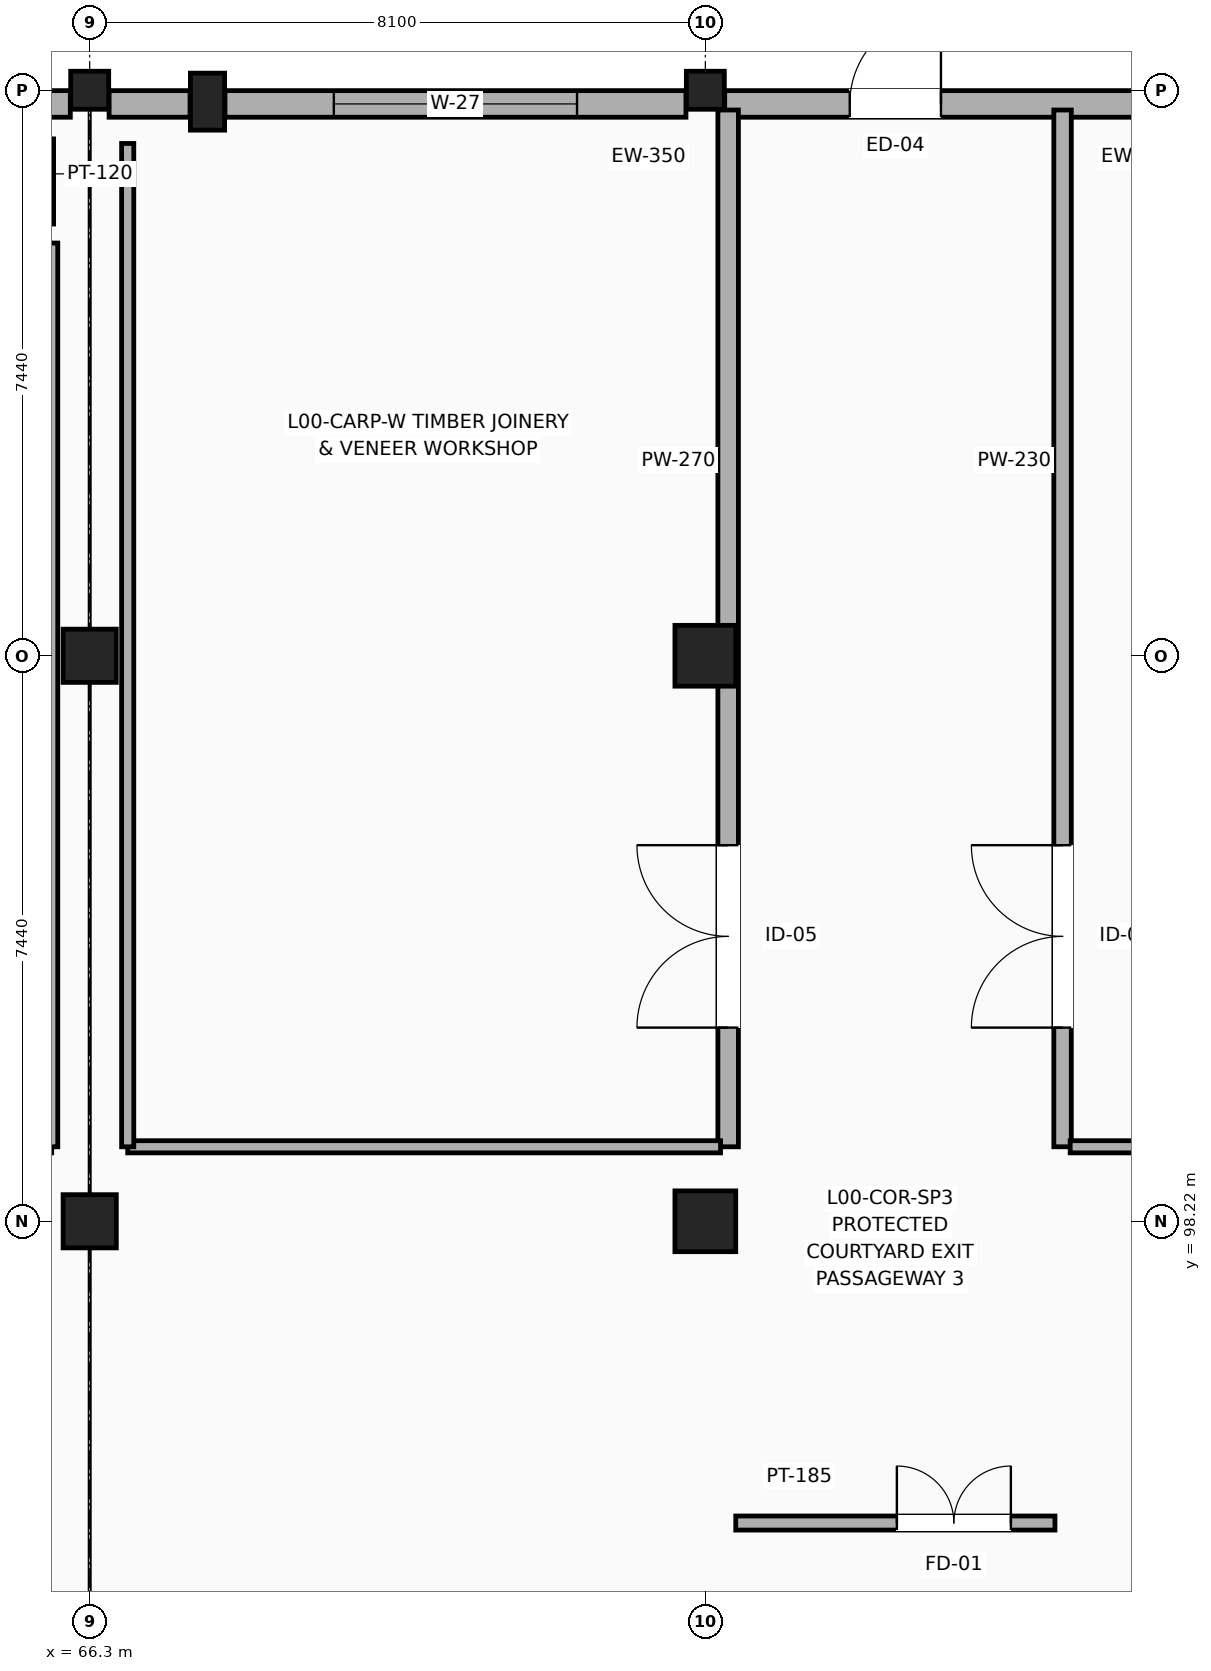
"""IFC4 building model, lengths in metres.
Left out: names, types, materials, properties, quantities, classifications, styles, units other than length and angle.
Written with IfcOpenShell. Run it as: python <this file> out.ifc"""

import sys

from ifc_helpers import new_model, si_unit, direction, frame, frame_2d, origin, origin_2d, place, context, subcontext, project, spatial, rectangle, extrude, element, fill, save


model = new_model("IFC4")
c1 = context("Model", 3, precision=1e-05, world=origin(), true_north=direction((0.0, 1.0)))
c2 = subcontext(c1, "Body", "Model", "MODEL_VIEW")
j1 = project(units=[si_unit("LENGTHUNIT", "METRE"), si_unit("PLANEANGLEUNIT", "RADIAN")], contexts=[c1])
p1 = place(None, origin())
s1 = spatial("IfcSite", under=j1, at=p1, CompositionType="ELEMENT")
p2 = place(p1, origin())
s2 = spatial("IfcBuilding", under=s1, at=p2, CompositionType="ELEMENT")
p3 = place(p2, origin())
s3 = spatial("IfcBuildingStorey", under=s2, at=p3, CompositionType="ELEMENT", Elevation=0.0)
p4 = place(p3, frame((67.85, 112.95, 0.0), z_axis=(0.0, 0.0, 1.0), x_axis=(1.0, 0.0, 0.0)))
e1 = element("IfcColumn", 1, at=p4, inside=s3, PredefinedType="PILASTER", context=c2, shape_type="SweptSolid", body=[
    extrude(rectangle(XDim=0.45, YDim=0.75, at=origin_2d()), origin(), (0.0, 0.0, 1.0), 5.4),
])
for number, where, z_axis, x_axis in (
    (2, (66.3, 98.22, 0.0), (0.0, 0.0, 1.0), (1.0, 0.0, 0.0)),
    (3, (66.3, 105.66, 0.0), (0.0, 0.0, 1.0), (1.0, 0.0, 0.0)),
):
    element("IfcColumn", number, at=place(p3, frame(where, z_axis=z_axis, x_axis=x_axis)), inside=s3, PredefinedType="COLUMN", context=c2, shape_type="SweptSolid", body=[
        extrude(rectangle(XDim=0.7, YDim=0.7, at=origin_2d()), origin(), (0.0, 0.0, 1.0), 5.4),
    ])
p5 = place(p3, frame((66.3, 113.1, 0.0), z_axis=(0.0, 0.0, 1.0), x_axis=(1.0, 0.0, 0.0)))
e4 = element("IfcColumn", 4, at=p5, inside=s3, PredefinedType="COLUMN", context=c2, shape_type="SweptSolid", body=[
    extrude(rectangle(XDim=0.5, YDim=0.5, at=origin_2d()), origin(), (0.0, 0.0, 1.0), 5.4),
])
for number, where, z_axis, x_axis in (
    (5, (74.4, 98.22, 0.0), (0.0, 0.0, 1.0), (1.0, 0.0, 0.0)),
    (6, (74.4, 105.66, 0.0), (0.0, 0.0, 1.0), (1.0, 0.0, 0.0)),
):
    element("IfcColumn", number, at=place(p3, frame(where, z_axis=z_axis, x_axis=x_axis)), inside=s3, PredefinedType="COLUMN", context=c2, shape_type="SweptSolid", body=[
        extrude(rectangle(XDim=0.8, YDim=0.8, at=origin_2d()), origin(), (0.0, 0.0, 1.0), 5.4),
    ])
p6 = place(p3, frame((74.4, 113.1, 0.0), z_axis=(0.0, 0.0, 1.0), x_axis=(1.0, 0.0, 0.0)))
e7 = element("IfcColumn", 7, at=p6, inside=s3, PredefinedType="COLUMN", context=c2, shape_type="SweptSolid", body=[
    extrude(rectangle(XDim=0.5, YDim=0.5, at=origin_2d()), origin(), (0.0, 0.0, 1.0), 5.4),
])
p7 = place(p3, frame((58.455, 112.92, 0.0), z_axis=(0.0, 0.0, 1.0), x_axis=(1.0, 0.0, 0.0)))
e8 = element("IfcWall", 8, at=p7, inside=s3, PredefinedType="SOLIDWALL", context=c2, shape_type="SweptSolid", body=[
    extrude(rectangle(XDim=7.59, YDim=0.35, at=frame_2d((3.795, 0.0))), origin(), (0.0, 0.0, 1.0), 4.037),
])
p8 = place(p7, frame((2.72, 0.0, 0.9)))
e9 = element("IfcOpeningElement", 9, at=p8, cuts=e8, PredefinedType="OPENING", context=c2, shape_type="SweptSolid", body=[
    extrude(rectangle(XDim=2.15, YDim=2.25, at=frame_2d((1.075, 1.125))), frame((0.0, 0.185, 0.0), z_axis=(0.0, -1.0, 0.0), x_axis=(1.0, 0.0, 0.0)), (0.0, 0.0, 1.0), 0.37),
])
p9 = place(p3, frame((68.08, 112.92, 0.0), z_axis=(0.0, 0.0, 1.0), x_axis=(1.0, 0.0, 0.0)))
e10 = element("IfcWall", 10, at=p9, inside=s3, PredefinedType="SOLIDWALL", context=c2, shape_type="SweptSolid", body=[
    extrude(rectangle(XDim=6.065, YDim=0.35, at=frame_2d((3.032, 0.0))), origin(), (0.0, 0.0, 1.0), 4.137),
])
p10 = place(p9, frame((1.432, 0.0, 0.9)))
e11 = element("IfcOpeningElement", 11, at=p10, cuts=e10, PredefinedType="OPENING", context=c2, shape_type="SweptSolid", body=[
    extrude(rectangle(XDim=3.2, YDim=2.1, at=frame_2d((1.6, 1.05))), frame((0.0, 0.185, 0.0), z_axis=(0.0, -1.0, 0.0), x_axis=(1.0, 0.0, 0.0)), (0.0, 0.0, 1.0), 0.37),
])
p11 = place(p3, frame((66.555, 112.92, 0.0), z_axis=(0.0, 0.0, 1.0), x_axis=(1.0, 0.0, 0.0)))
e12 = element("IfcWall", 12, at=p11, inside=s3, PredefinedType="SOLIDWALL", context=c2, shape_type="SweptSolid", body=[
    extrude(rectangle(XDim=1.065, YDim=0.35, at=frame_2d((0.533, 0.0))), origin(), (0.0, 0.0, 1.0), 4.137),
])
p12 = place(p3, frame((74.655, 112.92, 0.0), z_axis=(0.0, 0.0, 1.0), x_axis=(1.0, 0.0, 0.0)))
e13 = element("IfcWall", 13, at=p12, inside=s3, PredefinedType="SOLIDWALL", context=c2, shape_type="SweptSolid", body=[
    extrude(rectangle(XDim=7.59, YDim=0.35, at=frame_2d((3.795, 0.0))), origin(), (0.0, 0.0, 1.0), 4.037),
])
p13 = place(p12, frame((1.645, 0.0, 0.0)))
e14 = element("IfcOpeningElement", 14, at=p13, cuts=e13, PredefinedType="OPENING", context=c2, shape_type="SweptSolid", body=[
    extrude(rectangle(XDim=1.2, YDim=2.2, at=frame_2d((0.6, 1.1))), frame((0.0, 0.185, 0.0), z_axis=(0.0, -1.0, 0.0), x_axis=(1.0, 0.0, 0.0)), (0.0, 0.0, 1.0), 0.37),
])
p14 = place(p3, frame((65.765, 111.34, 0.0), z_axis=(0.0, 0.0, 1.0), x_axis=(0.0, 1.0, 0.0)))
e15 = element("IfcWall", 15, at=p14, inside=s3, PredefinedType="PARTITIONING", context=c2, shape_type="SweptSolid", body=[
    extrude(rectangle(XDim=1.12, YDim=0.12, at=frame_2d((0.56, 0.0))), origin(), (0.0, 0.0, 1.0), 5.085),
])
p15 = place(p3, frame((74.8, 94.25, 0.0), z_axis=(0.0, 0.0, 1.0), x_axis=(1.0, 0.0, 0.0)))
e16 = element("IfcWall", 16, at=p15, inside=s3, PredefinedType="PARTITIONING", context=c2, shape_type="SweptSolid", body=[
    extrude(rectangle(XDim=4.2, YDim=0.185, at=frame_2d((2.1, 0.0))), origin(), (0.0, 0.0, 1.0), 4.817),
])
p16 = place(p15, frame((2.12, 0.0, 0.0)))
e17 = element("IfcOpeningElement", 17, at=p16, cuts=e16, PredefinedType="OPENING", context=c2, shape_type="SweptSolid", body=[
    extrude(rectangle(XDim=1.5, YDim=2.2, at=frame_2d((0.75, 1.1))), frame((0.0, 0.103, 0.0), z_axis=(0.0, -1.0, 0.0), x_axis=(1.0, 0.0, 0.0)), (0.0, 0.0, 1.0), 0.205),
])
p17 = place(p3, frame((74.7, 99.2, 0.0), z_axis=(0.0, 0.0, 1.0), x_axis=(0.0, 1.0, 0.0)))
e18 = element("IfcWall", 18, at=p17, inside=s3, PredefinedType="SOLIDWALL", context=c2, shape_type="SweptSolid", body=[
    extrude(rectangle(XDim=13.64, YDim=0.27, at=frame_2d((6.82, 0.0))), origin(), (0.0, 0.0, 1.0), 4.137),
])
p18 = place(p17, frame((1.568, 0.0, 0.0)))
e19 = element("IfcOpeningElement", 19, at=p18, cuts=e18, PredefinedType="OPENING", context=c2, shape_type="SweptSolid", body=[
    extrude(rectangle(XDim=2.4, YDim=2.8, at=frame_2d((1.2, 1.4))), frame((0.0, 0.145, 0.0), z_axis=(0.0, -1.0, 0.0), x_axis=(1.0, 0.0, 0.0)), (0.0, 0.0, 1.0), 0.29),
])
p19 = place(p3, frame((79.1, 99.2, 0.0), z_axis=(0.0, 0.0, 1.0), x_axis=(0.0, 1.0, 0.0)))
e20 = element("IfcWall", 20, at=p19, inside=s3, PredefinedType="SOLIDWALL", context=c2, shape_type="SweptSolid", body=[
    extrude(rectangle(XDim=13.64, YDim=0.23, at=frame_2d((6.82, 0.0))), origin(), (0.0, 0.0, 1.0), 4.137),
])
p20 = place(p19, frame((1.568, 0.0, 0.0)))
e21 = element("IfcOpeningElement", 21, at=p20, cuts=e20, PredefinedType="OPENING", context=c2, shape_type="SweptSolid", body=[
    extrude(rectangle(XDim=2.4, YDim=2.8, at=frame_2d((1.2, 1.4))), frame((0.0, 0.125, 0.0), z_axis=(0.0, -1.0, 0.0), x_axis=(1.0, 0.0, 0.0)), (0.0, 0.0, 1.0), 0.25),
])
p21 = place(p3, frame((65.8, 99.2, 0.0), z_axis=(0.0, 0.0, 1.0), x_axis=(0.0, 1.0, 0.0)))
e22 = element("IfcWall", 22, at=p21, inside=s3, PredefinedType="PARTITIONING", context=c2, shape_type="SweptSolid", body=[
    extrude(rectangle(XDim=11.89, YDim=0.16, at=frame_2d((5.945, 0.0))), origin(), (0.0, 0.0, 1.0), 4.137),
])
p22 = place(p3, frame((66.8, 99.2, 0.0), z_axis=(0.0, 0.0, 1.0), x_axis=(1.0, 0.0, 0.0)))
e23 = element("IfcWall", 23, at=p22, inside=s3, PredefinedType="PARTITIONING", context=c2, shape_type="SweptSolid", body=[
    extrude(rectangle(XDim=7.8, YDim=0.16, at=frame_2d((3.9, 0.0))), origin(), (0.0, 0.0, 1.0), 4.337),
])
p23 = place(p3, frame((66.8, 99.2, 0.0), z_axis=(0.0, 0.0, 1.0), x_axis=(0.0, 1.0, 0.0)))
e24 = element("IfcWall", 24, at=p23, inside=s3, PredefinedType="PARTITIONING", context=c2, shape_type="SweptSolid", body=[
    extrude(rectangle(XDim=13.2, YDim=0.16, at=frame_2d((6.6, 0.0))), origin(), (0.0, 0.0, 1.0), 4.137),
])
p24 = place(p3, frame((79.2, 99.2, 0.0), z_axis=(0.0, 0.0, 1.0), x_axis=(1.0, 0.0, 0.0)))
e25 = element("IfcWall", 25, at=p24, inside=s3, PredefinedType="PARTITIONING", context=c2, shape_type="SweptSolid", body=[
    extrude(rectangle(XDim=19.0, YDim=0.16, at=frame_2d((9.5, 0.0))), origin(), (0.0, 0.0, 1.0), 4.037),
])
p25 = place(p10, origin())
e26 = element("IfcWindow", 26, at=p25, inside=s3, PartitioningType="SINGLE_PANEL", PredefinedType="WINDOW", context=c2, shape_type="SweptSolid", body=[
    extrude(rectangle(XDim=3.2, YDim=2.1, at=frame_2d((1.6, 1.05))), frame((0.0, 0.03, 0.0), z_axis=(0.0, -1.0, 0.0), x_axis=(1.0, 0.0, 0.0)), (0.0, 0.0, 1.0), 0.06),
])
fill(e11, e26)
p26 = place(p13, origin())
e27 = element("IfcDoor", 27, at=p26, inside=s3, OperationType="SINGLE_SWING_RIGHT", PredefinedType="DOOR", context=c2, shape_type="SweptSolid", body=[
    extrude(rectangle(XDim=1.2, YDim=2.2, at=frame_2d((0.6, 1.1))), frame((0.0, 0.025, 0.0), z_axis=(0.0, -1.0, 0.0), x_axis=(1.0, 0.0, 0.0)), (0.0, 0.0, 1.0), 0.05),
])
fill(e14, e27)
p27 = place(p16, origin())
e28 = element("IfcDoor", 28, at=p27, inside=s3, OperationType="DOUBLE_DOOR_SINGLE_SWING", PredefinedType="DOOR", context=c2, shape_type="SweptSolid", body=[
    extrude(rectangle(XDim=1.5, YDim=2.2, at=frame_2d((0.75, 1.1))), frame((0.0, 0.025, 0.0), z_axis=(0.0, -1.0, 0.0), x_axis=(1.0, 0.0, 0.0)), (0.0, 0.0, 1.0), 0.05),
])
fill(e17, e28)
p28 = place(p18, origin())
e29 = element("IfcDoor", 29, at=p28, inside=s3, OperationType="DOUBLE_DOOR_SINGLE_SWING", PredefinedType="DOOR", context=c2, shape_type="SweptSolid", body=[
    extrude(rectangle(XDim=2.4, YDim=2.8, at=frame_2d((1.2, 1.4))), frame((0.0, 0.025, 0.0), z_axis=(0.0, -1.0, 0.0), x_axis=(1.0, 0.0, 0.0)), (0.0, 0.0, 1.0), 0.05),
])
fill(e19, e29)
p29 = place(p20, origin())
e30 = element("IfcDoor", 30, at=p29, inside=s3, OperationType="DOUBLE_DOOR_SINGLE_SWING", PredefinedType="DOOR", context=c2, shape_type="SweptSolid", body=[
    extrude(rectangle(XDim=2.4, YDim=2.8, at=frame_2d((1.2, 1.4))), frame((0.0, 0.025, 0.0), z_axis=(0.0, -1.0, 0.0), x_axis=(1.0, 0.0, 0.0)), (0.0, 0.0, 1.0), 0.05),
])
fill(e21, e30)
save(model, sys.argv[1])
